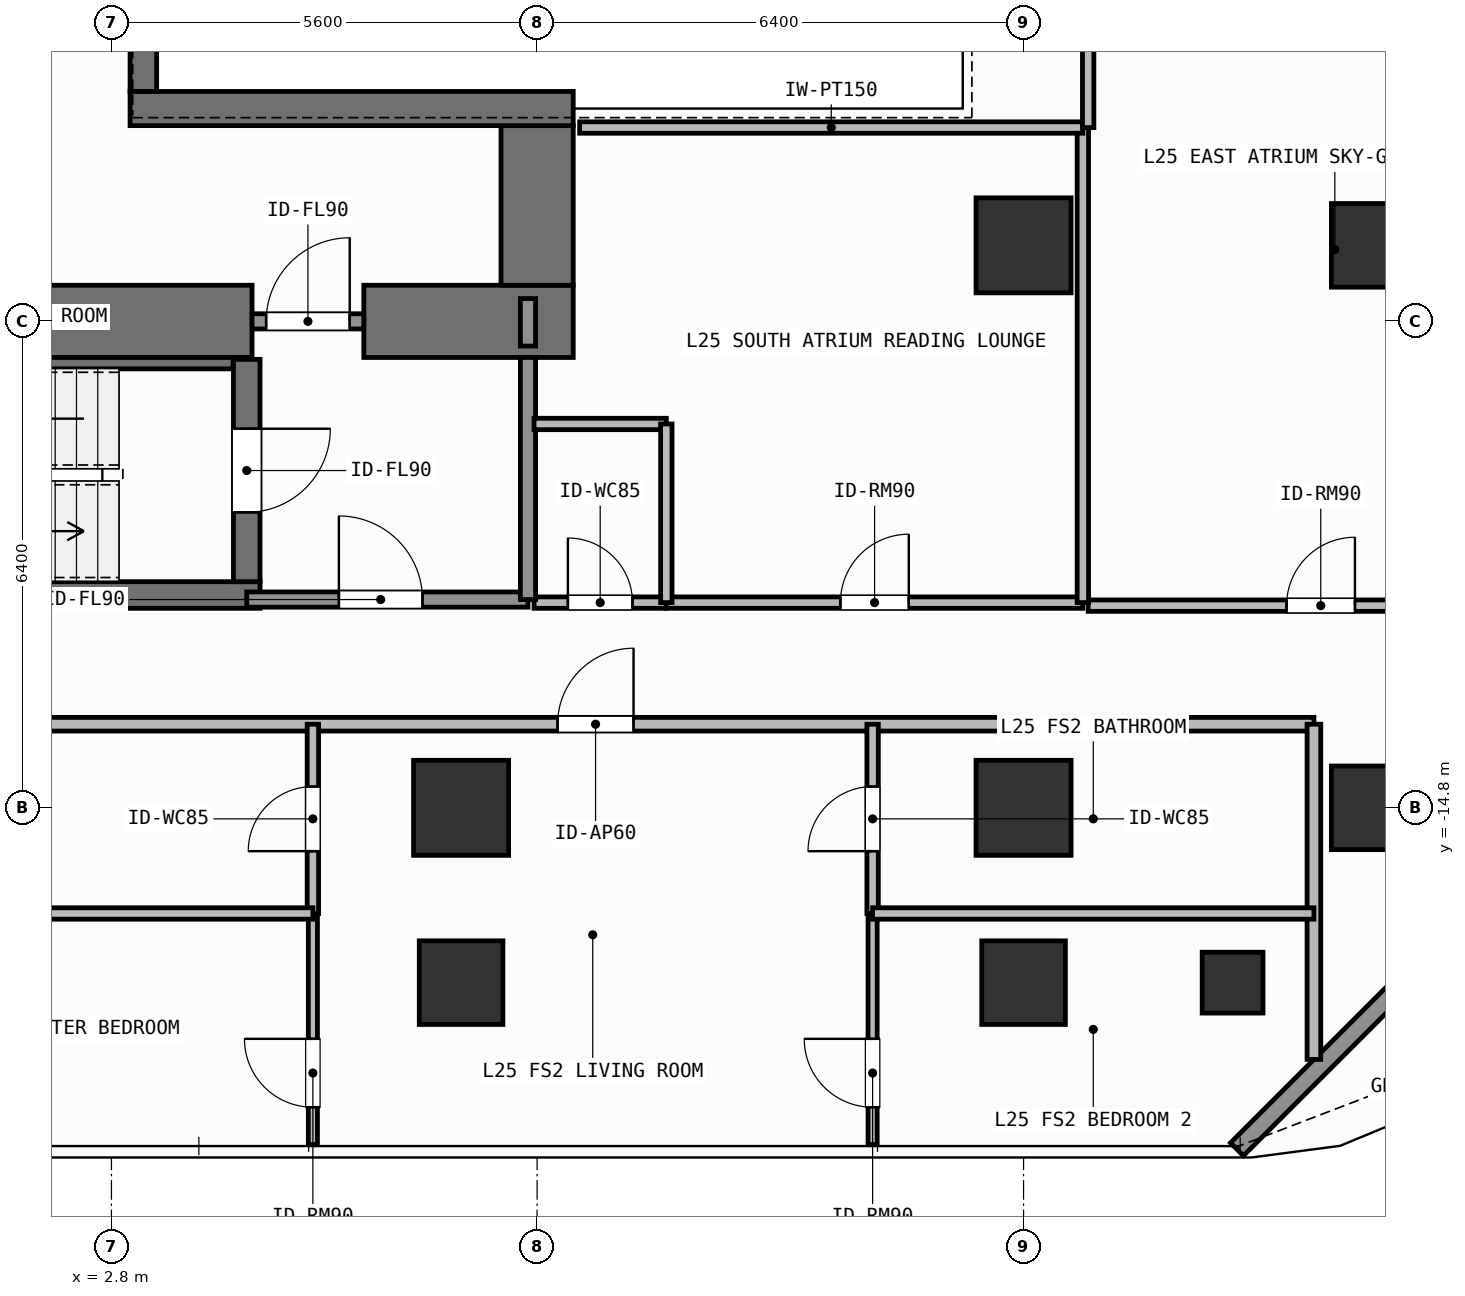
"""IFC4 building model, lengths in metres.
Left out: names, types, materials, properties, quantities, classifications, styles, units other than length and angle.
Written with IfcOpenShell. Run it as: python <this file> out.ifc"""

import sys

from ifc_helpers import new_model, si_unit, direction, frame, frame_2d, origin, origin_2d, place, context, subcontext, project, spatial, rectangle, hollow_rectangle, extrude, element, fill, save


model = new_model("IFC4")
c1 = context("Model", 3, precision=1e-05, world=origin(), true_north=direction((0.0, 1.0)))
c2 = subcontext(c1, "Body", "Model", "MODEL_VIEW")
j1 = project(units=[si_unit("LENGTHUNIT", "METRE"), si_unit("PLANEANGLEUNIT", "RADIAN")], contexts=[c1])
p1 = place(None, origin())
s1 = spatial("IfcSite", under=j1, at=p1, CompositionType="ELEMENT")
p2 = place(p1, origin())
s2 = spatial("IfcBuilding", under=s1, at=p2, CompositionType="ELEMENT")
p3 = place(p2, frame((0.0, 0.0, 100.8)))
s3 = spatial("IfcBuildingStorey", under=s2, at=p3, CompositionType="ELEMENT", Elevation=100.8)
p4 = place(p3, frame((-2.62, -8.4, 0.0), z_axis=(0.0, 0.0, 1.0), x_axis=(1.0, 0.0, 0.0)))
e1 = element("IfcWall", 1, at=p4, inside=s3, PredefinedType="SHEAR", context=c2, shape_type="SweptSolid", body=[
    extrude(rectangle(XDim=7.27, YDim=0.95, at=frame_2d((3.635, 0.0))), origin(), (0.0, 0.0, 1.0), 3.9),
])
p5 = place(p3, frame((6.12, -8.4, 0.0), z_axis=(0.0, 0.0, 1.0), x_axis=(1.0, 0.0, 0.0)))
e2 = element("IfcWall", 2, at=p5, inside=s3, PredefinedType="SHEAR", context=c2, shape_type="SweptSolid", body=[
    extrude(rectangle(XDim=2.755, YDim=0.95, at=frame_2d((1.377, 0.0))), origin(), (0.0, 0.0, 1.0), 3.9),
])
p6 = place(p3, frame((8.4, -7.925, 0.0), z_axis=(0.0, 0.0, 1.0), x_axis=(0.0, 1.0, 0.0)))
e3 = element("IfcWall", 3, at=p6, inside=s3, PredefinedType="SHEAR", context=c2, shape_type="SweptSolid", body=[
    extrude(rectangle(XDim=2.1, YDim=0.95, at=frame_2d((1.05, 0.0))), origin(), (0.0, 0.0, 1.0), 3.9),
])
p7 = place(p3, frame((3.045, -5.6, 0.0), z_axis=(0.0, 0.0, 1.0), x_axis=(1.0, 0.0, 0.0)))
e4 = element("IfcWall", 4, at=p7, inside=s3, PredefinedType="SHEAR", context=c2, shape_type="SweptSolid", body=[
    extrude(rectangle(XDim=5.83, YDim=0.45, at=frame_2d((2.915, 0.0))), origin(), (0.0, 0.0, 1.0), 3.9),
])
p8 = place(p3, frame((3.22, -5.375, 0.0), z_axis=(0.0, 0.0, 1.0), x_axis=(0.0, 1.0, 0.0)))
e5 = element("IfcWall", 5, at=p8, inside=s3, PredefinedType="SHEAR", context=c2, shape_type="SweptSolid", body=[
    extrude(rectangle(XDim=10.75, YDim=0.35, at=frame_2d((5.375, 0.0))), origin(), (0.0, 0.0, 1.0), 3.9),
])
p9 = place(p3, frame((-2.555, -12.0, 0.0), z_axis=(0.0, 0.0, 1.0), x_axis=(1.0, 0.0, 0.0)))
e6 = element("IfcWall", 6, at=p9, inside=s3, PredefinedType="SHEAR", context=c2, shape_type="SweptSolid", body=[
    extrude(rectangle(XDim=7.31, YDim=0.35, at=frame_2d((3.655, 0.0))), origin(), (0.0, 0.0, 1.0), 3.9),
])
p10 = place(p3, frame((-2.2, -8.95, 0.0), z_axis=(0.0, 0.0, 1.0), x_axis=(1.0, 0.0, 0.0)))
e7 = element("IfcWall", 7, at=p10, inside=s3, PredefinedType="SHEAR", context=c2, shape_type="SweptSolid", body=[
    extrude(rectangle(XDim=6.6, YDim=0.15, at=frame_2d((3.3, 0.0))), origin(), (0.0, 0.0, 1.0), 3.9),
])
p11 = place(p3, frame((4.58, -8.9, 0.0), z_axis=(0.0, 0.0, 1.0), x_axis=(0.0, -1.0, 0.0)))
e8 = element("IfcWall", 8, at=p11, inside=s3, PredefinedType="SHEAR", context=c2, shape_type="SweptSolid", body=[
    extrude(rectangle(XDim=2.925, YDim=0.35, at=frame_2d((1.462, 0.0))), origin(), (0.0, 0.0, 1.0), 3.9),
])
p12 = place(p11, frame((0.913, 0.0, 0.0)))
e9 = element("IfcOpeningElement", 9, at=p12, cuts=e8, PredefinedType="OPENING", context=c2, shape_type="SweptSolid", body=[
    extrude(rectangle(XDim=1.1, YDim=2.15, at=frame_2d((0.55, 1.075))), frame((0.0, 0.185, 0.0), z_axis=(0.0, -1.0, 0.0), x_axis=(1.0, 0.0, 0.0)), (0.0, 0.0, 1.0), 0.37),
])
for number, where, z_axis, x_axis in (
    (10, (7.4, -14.8, 0.0), (0.0, 0.0, 1.0), (1.0, 0.0, 0.0)),
    (11, (14.8, -14.8, 0.0), (0.0, 0.0, 1.0), (1.0, 0.0, 0.0)),
    (12, (14.8, -7.4, 0.0), (0.0, 0.0, 1.0), (1.0, 0.0, 0.0)),
):
    element("IfcColumn", number, at=place(p3, frame(where, z_axis=z_axis, x_axis=x_axis)), inside=s3, PredefinedType="COLUMN", context=c2, shape_type="SweptSolid", body=[
        extrude(rectangle(XDim=1.25, YDim=1.25, at=origin_2d()), origin(), (0.0, 0.0, 1.0), 3.9),
    ])
for number, where, z_axis, x_axis in (
    (13, (19.4, -14.8, 0.0), (0.0, 0.0, 1.0), (1.0, 0.0, 0.0)),
    (14, (19.4, -7.4, 0.0), (0.0, 0.0, 1.0), (1.0, 0.0, 0.0)),
    (15, (7.4, -17.1, 0.0), (0.0, 0.0, 1.0), (1.0, 0.0, 0.0)),
    (16, (14.8, -17.1, 0.0), (0.0, 0.0, 1.0), (1.0, 0.0, 0.0)),
):
    element("IfcColumn", number, at=place(p3, frame(where, z_axis=z_axis, x_axis=x_axis)), inside=s3, PredefinedType="COLUMN", context=c2, shape_type="SweptSolid", body=[
        extrude(rectangle(XDim=1.1, YDim=1.1, at=origin_2d()), origin(), (0.0, 0.0, 1.0), 3.9),
    ])
p13 = place(p3, frame((17.55, -17.1, 0.0), z_axis=(0.0, 0.0, 1.0), x_axis=(1.0, 0.0, 0.0)))
e17 = element("IfcColumn", 17, at=p13, inside=s3, PredefinedType="COLUMN", context=c2, shape_type="SweptSolid", body=[
    extrude(hollow_rectangle(XDim=0.8, YDim=0.8, WallThickness=0.036, at=origin_2d()), origin(), (0.0, 0.0, 1.0), 3.9),
])
p14 = place(p3, frame((22.192, -14.708, 0.0), z_axis=(0.0, 0.0, 1.0), x_axis=(-0.707087954376, -0.707125607496, 0.0)))
e18 = element("IfcWall", 18, at=p14, inside=s3, PredefinedType="SOLIDWALL", context=c2, shape_type="SweptSolid", body=[
    extrude(rectangle(XDim=6.484, YDim=0.24, at=frame_2d((3.242, 0.0))), origin(), (0.0, 0.0, 1.0), 3.68),
])
p15 = place(p3, frame((4.58, -12.06, 0.0), z_axis=(0.0, 0.0, 1.0), x_axis=(1.0, 0.0, 0.0)))
e19 = element("IfcWall", 19, at=p15, inside=s3, PredefinedType="SOLIDWALL", context=c2, shape_type="SweptSolid", body=[
    extrude(rectangle(XDim=3.7, YDim=0.2, at=frame_2d((1.85, 0.0))), origin(), (0.0, 0.0, 1.0), 3.68),
])
p16 = place(p15, frame((1.212, 0.0, 0.0)))
e20 = element("IfcOpeningElement", 20, at=p16, cuts=e19, PredefinedType="OPENING", context=c2, shape_type="SweptSolid", body=[
    extrude(rectangle(XDim=1.1, YDim=2.15, at=frame_2d((0.55, 1.075))), frame((0.0, 0.11, 0.0), z_axis=(0.0, -1.0, 0.0), x_axis=(1.0, 0.0, 0.0)), (0.0, 0.0, 1.0), 0.22),
])
p17 = place(p3, frame((4.65, -8.4, 0.0), z_axis=(0.0, 0.0, 1.0), x_axis=(1.0, 0.0, 0.0)))
e21 = element("IfcWall", 21, at=p17, inside=s3, PredefinedType="SOLIDWALL", context=c2, shape_type="SweptSolid", body=[
    extrude(rectangle(XDim=1.47, YDim=0.2, at=frame_2d((0.735, 0.0))), origin(), (0.0, 0.0, 1.0), 2.72),
])
p18 = place(p17, frame((0.185, 0.0, 0.0)))
e22 = element("IfcOpeningElement", 22, at=p18, cuts=e21, PredefinedType="OPENING", context=c2, shape_type="SweptSolid", body=[
    extrude(rectangle(XDim=1.1, YDim=2.15, at=frame_2d((0.55, 1.075))), frame((0.0, 0.11, 0.0), z_axis=(0.0, -1.0, 0.0), x_axis=(1.0, 0.0, 0.0)), (0.0, 0.0, 1.0), 0.22),
])
p19 = place(p3, frame((8.36, -12.1, 0.0), z_axis=(0.0, 0.0, 1.0), x_axis=(1.0, 0.0, 0.0)))
e23 = element("IfcWall", 23, at=p19, inside=s3, PredefinedType="PARTITIONING", context=c2, shape_type="SweptSolid", body=[
    extrude(rectangle(XDim=1.74, YDim=0.15, at=frame_2d((0.87, 0.0))), origin(), (0.0, 0.0, 1.0), 3.68),
])
p20 = place(p19, frame((0.445, 0.0, 0.0)))
e24 = element("IfcOpeningElement", 24, at=p20, cuts=e23, PredefinedType="OPENING", context=c2, shape_type="SweptSolid", body=[
    extrude(rectangle(XDim=0.85, YDim=2.1, at=frame_2d((0.425, 1.05))), frame((0.0, 0.085, 0.0), z_axis=(0.0, -1.0, 0.0), x_axis=(1.0, 0.0, 0.0)), (0.0, 0.0, 1.0), 0.17),
])
p21 = place(p3, frame((10.1, -12.1, 0.0), z_axis=(0.0, 0.0, 1.0), x_axis=(1.0, 0.0, 0.0)))
e25 = element("IfcWall", 25, at=p21, inside=s3, PredefinedType="PARTITIONING", context=c2, shape_type="SweptSolid", body=[
    extrude(rectangle(XDim=5.48, YDim=0.15, at=frame_2d((2.74, 0.0))), origin(), (0.0, 0.0, 1.0), 3.68),
])
p22 = place(p21, frame((2.29, 0.0, 0.0)))
e26 = element("IfcOpeningElement", 26, at=p22, cuts=e25, PredefinedType="OPENING", context=c2, shape_type="SweptSolid", body=[
    extrude(rectangle(XDim=0.9, YDim=2.1, at=frame_2d((0.45, 1.05))), frame((0.0, 0.085, 0.0), z_axis=(0.0, -1.0, 0.0), x_axis=(1.0, 0.0, 0.0)), (0.0, 0.0, 1.0), 0.17),
])
p23 = place(p3, frame((0.974, -13.7, 0.0), z_axis=(0.0, 0.0, 1.0), x_axis=(1.0, 0.0, 0.0)))
e27 = element("IfcWall", 27, at=p23, inside=s3, PredefinedType="PARTITIONING", context=c2, shape_type="SweptSolid", body=[
    extrude(rectangle(XDim=17.646, YDim=0.18, at=frame_2d((8.823, 0.0))), origin(), (0.0, 0.0, 1.0), 3.68),
])
p24 = place(p23, frame((7.695, 0.0, 0.0)))
e28 = element("IfcOpeningElement", 28, at=p24, cuts=e27, PredefinedType="OPENING", context=c2, shape_type="SweptSolid", body=[
    extrude(rectangle(XDim=1.0, YDim=2.2, at=frame_2d((0.5, 1.1))), frame((0.0, 0.1, 0.0), z_axis=(0.0, -1.0, 0.0), x_axis=(1.0, 0.0, 0.0)), (0.0, 0.0, 1.0), 0.2),
])
p25 = place(p3, frame((5.45, -16.19, 0.0), z_axis=(0.0, 0.0, 1.0), x_axis=(0.0, 1.0, 0.0)))
e29 = element("IfcWall", 29, at=p25, inside=s3, PredefinedType="PARTITIONING", context=c2, shape_type="SweptSolid", body=[
    extrude(rectangle(XDim=2.49, YDim=0.15, at=frame_2d((1.245, 0.0))), origin(), (0.0, 0.0, 1.0), 3.68),
])
p26 = place(p25, frame((0.82, 0.0, 0.0)))
e30 = element("IfcOpeningElement", 30, at=p26, cuts=e29, PredefinedType="OPENING", context=c2, shape_type="SweptSolid", body=[
    extrude(rectangle(XDim=0.85, YDim=2.1, at=frame_2d((0.425, 1.05))), frame((0.0, 0.085, 0.0), z_axis=(0.0, -1.0, 0.0), x_axis=(1.0, 0.0, 0.0)), (0.0, 0.0, 1.0), 0.17),
])
p27 = place(p3, frame((5.45, -19.23, 0.0), z_axis=(0.0, 0.0, 1.0), x_axis=(0.0, 1.0, 0.0)))
e31 = element("IfcWall", 31, at=p27, inside=s3, PredefinedType="PARTITIONING", context=c2, shape_type="SweptSolid", body=[
    extrude(rectangle(XDim=3.04, YDim=0.12, at=frame_2d((1.52, 0.0))), origin(), (0.0, 0.0, 1.0), 3.68),
])
p28 = place(p27, frame((0.491, 0.0, 0.0)))
e32 = element("IfcOpeningElement", 32, at=p28, cuts=e31, PredefinedType="OPENING", context=c2, shape_type="SweptSolid", body=[
    extrude(rectangle(XDim=0.9, YDim=2.1, at=frame_2d((0.45, 1.05))), frame((0.0, 0.07, 0.0), z_axis=(0.0, -1.0, 0.0), x_axis=(1.0, 0.0, 0.0)), (0.0, 0.0, 1.0), 0.14),
])
p29 = place(p3, frame((12.814, -16.19, 0.0), z_axis=(0.0, 0.0, 1.0), x_axis=(0.0, 1.0, 0.0)))
e33 = element("IfcWall", 33, at=p29, inside=s3, PredefinedType="PARTITIONING", context=c2, shape_type="SweptSolid", body=[
    extrude(rectangle(XDim=2.49, YDim=0.15, at=frame_2d((1.245, 0.0))), origin(), (0.0, 0.0, 1.0), 3.68),
])
p30 = place(p29, frame((0.82, 0.0, 0.0)))
e34 = element("IfcOpeningElement", 34, at=p30, cuts=e33, PredefinedType="OPENING", context=c2, shape_type="SweptSolid", body=[
    extrude(rectangle(XDim=0.85, YDim=2.1, at=frame_2d((0.425, 1.05))), frame((0.0, 0.085, 0.0), z_axis=(0.0, -1.0, 0.0), x_axis=(1.0, 0.0, 0.0)), (0.0, 0.0, 1.0), 0.17),
])
p31 = place(p3, frame((12.814, -19.23, 0.0), z_axis=(0.0, 0.0, 1.0), x_axis=(0.0, 1.0, 0.0)))
e35 = element("IfcWall", 35, at=p31, inside=s3, PredefinedType="PARTITIONING", context=c2, shape_type="SweptSolid", body=[
    extrude(rectangle(XDim=3.04, YDim=0.12, at=frame_2d((1.52, 0.0))), origin(), (0.0, 0.0, 1.0), 3.68),
])
p32 = place(p31, frame((0.491, 0.0, 0.0)))
e36 = element("IfcOpeningElement", 36, at=p32, cuts=e35, PredefinedType="OPENING", context=c2, shape_type="SweptSolid", body=[
    extrude(rectangle(XDim=0.9, YDim=2.1, at=frame_2d((0.45, 1.05))), frame((0.0, 0.07, 0.0), z_axis=(0.0, -1.0, 0.0), x_axis=(1.0, 0.0, 0.0)), (0.0, 0.0, 1.0), 0.14),
])
p33 = place(p3, frame((15.65, -12.14, 0.0), z_axis=(0.0, 0.0, 1.0), x_axis=(1.0, 0.0, 0.0)))
e37 = element("IfcWall", 37, at=p33, inside=s3, PredefinedType="PARTITIONING", context=c2, shape_type="SweptSolid", body=[
    extrude(rectangle(XDim=6.47, YDim=0.15, at=frame_2d((3.235, 0.0))), origin(), (0.0, 0.0, 1.0), 3.68),
])
p34 = place(p33, frame((2.61, 0.0, 0.0)))
e38 = element("IfcOpeningElement", 38, at=p34, cuts=e37, PredefinedType="OPENING", context=c2, shape_type="SweptSolid", body=[
    extrude(rectangle(XDim=0.9, YDim=2.1, at=frame_2d((0.45, 1.05))), frame((0.0, 0.085, 0.0), z_axis=(0.0, -1.0, 0.0), x_axis=(1.0, 0.0, 0.0)), (0.0, 0.0, 1.0), 0.17),
])
p35 = place(p3, frame((8.28, -12.06, 0.0), z_axis=(0.0, 0.0, 1.0), x_axis=(0.0, 1.0, 0.0)))
e39 = element("IfcWall", 39, at=p35, inside=s3, PredefinedType="SOLIDWALL", context=c2, shape_type="SweptSolid", body=[
    extrude(rectangle(XDim=3.185, YDim=0.2, at=frame_2d((1.593, 0.0))), origin(), (0.0, 0.0, 1.0), 3.68),
])
p36 = place(p3, frame((8.28, -8.725, 0.0), z_axis=(0.0, 0.0, 1.0), x_axis=(0.0, 1.0, 0.0)))
e40 = element("IfcWall", 40, at=p36, inside=s3, PredefinedType="SOLIDWALL", context=c2, shape_type="SweptSolid", body=[
    extrude(rectangle(XDim=0.625, YDim=0.2, at=frame_2d((0.312, 0.0))), origin(), (0.0, 0.0, 1.0), 3.68),
])
p37 = place(p3, frame((8.36, -9.75, 0.0), z_axis=(0.0, 0.0, 1.0), x_axis=(1.0, 0.0, 0.0)))
e41 = element("IfcWall", 41, at=p37, inside=s3, PredefinedType="PARTITIONING", context=c2, shape_type="SweptSolid", body=[
    extrude(rectangle(XDim=1.74, YDim=0.15, at=frame_2d((0.87, 0.0))), origin(), (0.0, 0.0, 1.0), 3.68),
])
p38 = place(p3, frame((10.1, -12.1, 0.0), z_axis=(0.0, 0.0, 1.0), x_axis=(0.0, 1.0, 0.0)))
e42 = element("IfcWall", 42, at=p38, inside=s3, PredefinedType="PARTITIONING", context=c2, shape_type="SweptSolid", body=[
    extrude(rectangle(XDim=2.35, YDim=0.15, at=frame_2d((1.175, 0.0))), origin(), (0.0, 0.0, 1.0), 3.68),
])
p39 = place(p3, frame((15.58, -12.1, 0.0), z_axis=(0.0, 0.0, 1.0), x_axis=(0.0, 1.0, 0.0)))
e43 = element("IfcWall", 43, at=p39, inside=s3, PredefinedType="PARTITIONING", context=c2, shape_type="SweptSolid", body=[
    extrude(rectangle(XDim=6.25, YDim=0.15, at=frame_2d((3.125, 0.0))), origin(), (0.0, 0.0, 1.0), 3.68),
])
p40 = place(p3, frame((8.96, -5.85, 0.0), z_axis=(0.0, 0.0, 1.0), x_axis=(1.0, 0.0, 0.0)))
e44 = element("IfcWall", 44, at=p40, inside=s3, PredefinedType="PARTITIONING", context=c2, shape_type="SweptSolid", body=[
    extrude(rectangle(XDim=6.62, YDim=0.15, at=frame_2d((3.31, 0.0))), origin(), (0.0, 0.0, 1.0), 3.68),
])
p41 = place(p3, frame((18.62, -18.11, 0.0), z_axis=(0.0, 0.0, 1.0), x_axis=(0.0, 1.0, 0.0)))
e45 = element("IfcWall", 45, at=p41, inside=s3, PredefinedType="PARTITIONING", context=c2, shape_type="SweptSolid", body=[
    extrude(rectangle(XDim=4.41, YDim=0.18, at=frame_2d((2.205, 0.0))), origin(), (0.0, 0.0, 1.0), 3.68),
])
p42 = place(p3, frame((0.974, -16.19, 0.0), z_axis=(0.0, 0.0, 1.0), x_axis=(1.0, 0.0, 0.0)))
e46 = element("IfcWall", 46, at=p42, inside=s3, PredefinedType="PARTITIONING", context=c2, shape_type="SweptSolid", body=[
    extrude(rectangle(XDim=4.476, YDim=0.15, at=frame_2d((2.238, 0.0))), origin(), (0.0, 0.0, 1.0), 3.68),
])
p43 = place(p3, frame((12.814, -16.19, 0.0), z_axis=(0.0, 0.0, 1.0), x_axis=(1.0, 0.0, 0.0)))
e47 = element("IfcWall", 47, at=p43, inside=s3, PredefinedType="PARTITIONING", context=c2, shape_type="SweptSolid", body=[
    extrude(rectangle(XDim=5.806, YDim=0.15, at=frame_2d((2.903, 0.0))), origin(), (0.0, 0.0, 1.0), 3.68),
])
p44 = place(p3, frame((15.65, -5.85, 0.0), z_axis=(0.0, 0.0, 1.0), x_axis=(0.0, 1.0, 0.0)))
e48 = element("IfcWall", 48, at=p44, inside=s3, PredefinedType="PARTITIONING", context=c2, shape_type="SweptSolid", body=[
    extrude(rectangle(XDim=3.1, YDim=0.15, at=frame_2d((1.55, 0.0))), origin(), (0.0, 0.0, 1.0), 3.68),
])
p45 = place(p12, origin())
e49 = element("IfcDoor", 49, at=p45, inside=s3, OperationType="SINGLE_SWING_LEFT", PredefinedType="DOOR", context=c2, shape_type="SweptSolid", body=[
    extrude(rectangle(XDim=1.1, YDim=2.15, at=frame_2d((0.55, 1.075))), frame((0.0, 0.025, 0.0), z_axis=(0.0, -1.0, 0.0), x_axis=(1.0, 0.0, 0.0)), (0.0, 0.0, 1.0), 0.05),
])
fill(e9, e49)
p46 = place(p16, origin())
e50 = element("IfcDoor", 50, at=p46, inside=s3, OperationType="SINGLE_SWING_LEFT", PredefinedType="DOOR", context=c2, shape_type="SweptSolid", body=[
    extrude(rectangle(XDim=1.1, YDim=2.15, at=frame_2d((0.55, 1.075))), frame((0.0, 0.025, 0.0), z_axis=(0.0, -1.0, 0.0), x_axis=(1.0, 0.0, 0.0)), (0.0, 0.0, 1.0), 0.05),
])
fill(e20, e50)
p47 = place(p18, origin())
e51 = element("IfcDoor", 51, at=p47, inside=s3, OperationType="SINGLE_SWING_RIGHT", PredefinedType="DOOR", context=c2, shape_type="SweptSolid", body=[
    extrude(rectangle(XDim=1.1, YDim=2.15, at=frame_2d((0.55, 1.075))), frame((0.0, 0.025, 0.0), z_axis=(0.0, -1.0, 0.0), x_axis=(1.0, 0.0, 0.0)), (0.0, 0.0, 1.0), 0.05),
])
fill(e22, e51)
p48 = place(p20, origin())
e52 = element("IfcDoor", 52, at=p48, inside=s3, OperationType="SINGLE_SWING_LEFT", PredefinedType="DOOR", context=c2, shape_type="SweptSolid", body=[
    extrude(rectangle(XDim=0.85, YDim=2.1, at=frame_2d((0.425, 1.05))), frame((0.0, 0.025, 0.0), z_axis=(0.0, -1.0, 0.0), x_axis=(1.0, 0.0, 0.0)), (0.0, 0.0, 1.0), 0.05),
])
fill(e24, e52)
p49 = place(p22, origin())
e53 = element("IfcDoor", 53, at=p49, inside=s3, OperationType="SINGLE_SWING_RIGHT", PredefinedType="DOOR", context=c2, shape_type="SweptSolid", body=[
    extrude(rectangle(XDim=0.9, YDim=2.1, at=frame_2d((0.45, 1.05))), frame((0.0, 0.025, 0.0), z_axis=(0.0, -1.0, 0.0), x_axis=(1.0, 0.0, 0.0)), (0.0, 0.0, 1.0), 0.05),
])
fill(e26, e53)
p50 = place(p24, origin())
e54 = element("IfcDoor", 54, at=p50, inside=s3, OperationType="SINGLE_SWING_RIGHT", PredefinedType="DOOR", context=c2, shape_type="SweptSolid", body=[
    extrude(rectangle(XDim=1.0, YDim=2.2, at=frame_2d((0.5, 1.1))), frame((0.0, 0.025, 0.0), z_axis=(0.0, -1.0, 0.0), x_axis=(1.0, 0.0, 0.0)), (0.0, 0.0, 1.0), 0.05),
])
fill(e28, e54)
p51 = place(p26, origin())
e55 = element("IfcDoor", 55, at=p51, inside=s3, OperationType="SINGLE_SWING_LEFT", PredefinedType="DOOR", context=c2, shape_type="SweptSolid", body=[
    extrude(rectangle(XDim=0.85, YDim=2.1, at=frame_2d((0.425, 1.05))), frame((0.0, 0.025, 0.0), z_axis=(0.0, -1.0, 0.0), x_axis=(1.0, 0.0, 0.0)), (0.0, 0.0, 1.0), 0.05),
])
fill(e30, e55)
p52 = place(p28, origin())
e56 = element("IfcDoor", 56, at=p52, inside=s3, OperationType="SINGLE_SWING_RIGHT", PredefinedType="DOOR", context=c2, shape_type="SweptSolid", body=[
    extrude(rectangle(XDim=0.9, YDim=2.1, at=frame_2d((0.45, 1.05))), frame((0.0, 0.025, 0.0), z_axis=(0.0, -1.0, 0.0), x_axis=(1.0, 0.0, 0.0)), (0.0, 0.0, 1.0), 0.05),
])
fill(e32, e56)
p53 = place(p30, origin())
e57 = element("IfcDoor", 57, at=p53, inside=s3, OperationType="SINGLE_SWING_LEFT", PredefinedType="DOOR", context=c2, shape_type="SweptSolid", body=[
    extrude(rectangle(XDim=0.85, YDim=2.1, at=frame_2d((0.425, 1.05))), frame((0.0, 0.025, 0.0), z_axis=(0.0, -1.0, 0.0), x_axis=(1.0, 0.0, 0.0)), (0.0, 0.0, 1.0), 0.05),
])
fill(e34, e57)
p54 = place(p32, origin())
e58 = element("IfcDoor", 58, at=p54, inside=s3, OperationType="SINGLE_SWING_RIGHT", PredefinedType="DOOR", context=c2, shape_type="SweptSolid", body=[
    extrude(rectangle(XDim=0.9, YDim=2.1, at=frame_2d((0.45, 1.05))), frame((0.0, 0.025, 0.0), z_axis=(0.0, -1.0, 0.0), x_axis=(1.0, 0.0, 0.0)), (0.0, 0.0, 1.0), 0.05),
])
fill(e36, e58)
p55 = place(p34, origin())
e59 = element("IfcDoor", 59, at=p55, inside=s3, OperationType="SINGLE_SWING_RIGHT", PredefinedType="DOOR", context=c2, shape_type="SweptSolid", body=[
    extrude(rectangle(XDim=0.9, YDim=2.1, at=frame_2d((0.45, 1.05))), frame((0.0, 0.025, 0.0), z_axis=(0.0, -1.0, 0.0), x_axis=(1.0, 0.0, 0.0)), (0.0, 0.0, 1.0), 0.05),
])
fill(e38, e59)
save(model, sys.argv[1])
